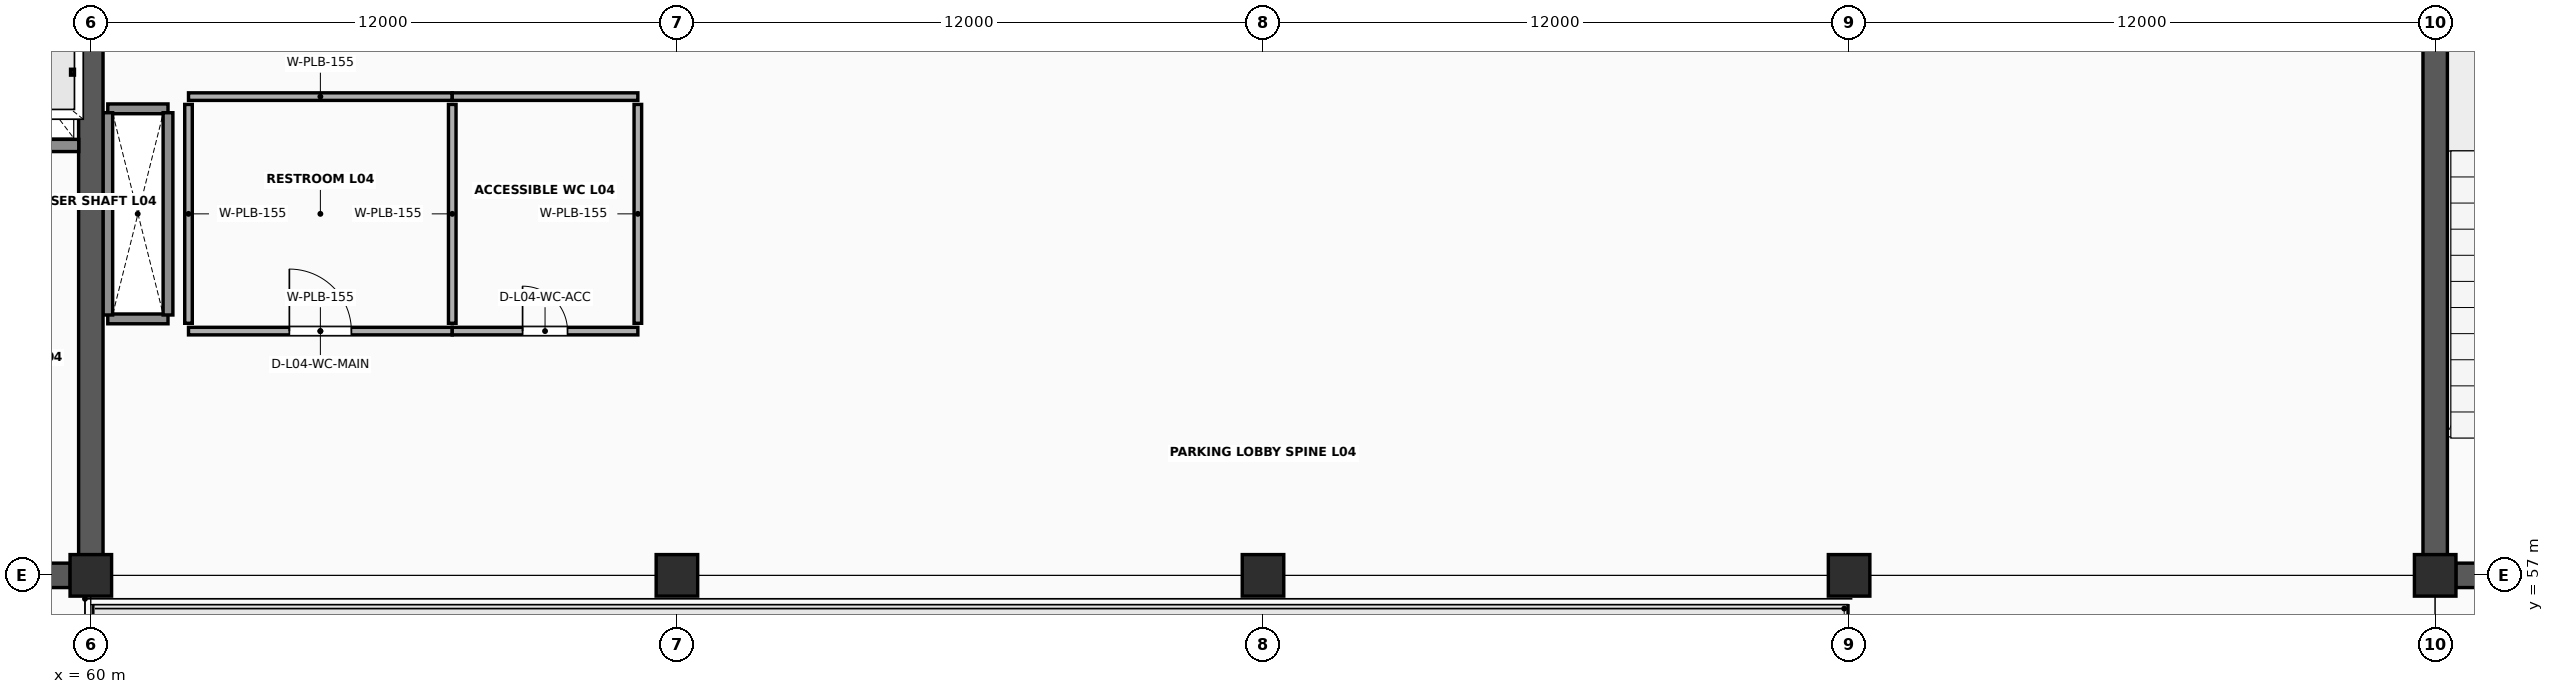
"""IFC4 building model, lengths in metres.
Left out: names, types, materials, properties, quantities, classifications, styles, units other than length and angle.
Written with IfcOpenShell. Run it as: python <this file> out.ifc"""

import sys

from ifc_helpers import new_model, si_unit, direction, frame, frame_2d, origin, origin_2d, place, context, subcontext, project, spatial, rectangle, extrude, element, fill, save


model = new_model("IFC4")
c1 = context("Model", 3, precision=1e-05, world=origin(), true_north=direction((0.0, 1.0)))
c2 = subcontext(c1, "Body", "Model", "MODEL_VIEW")
j1 = project(units=[si_unit("LENGTHUNIT", "METRE"), si_unit("PLANEANGLEUNIT", "RADIAN")], contexts=[c1])
p1 = place(None, origin())
s1 = spatial("IfcSite", under=j1, at=p1, CompositionType="ELEMENT")
p2 = place(p1, origin())
s2 = spatial("IfcBuilding", under=s1, at=p2, CompositionType="ELEMENT")
p3 = place(p2, frame((0.0, 0.0, 17.2)))
s3 = spatial("IfcBuildingStorey", under=s2, at=p3, CompositionType="ELEMENT", Elevation=17.2)
for number, where, z_axis, x_axis in (
    (1, (60.0, 57.0, 0.0), (0.0, 0.0, 1.0), (1.0, 0.0, 0.0)),
    (2, (72.0, 57.0, 0.0), (0.0, 0.0, 1.0), (1.0, 0.0, 0.0)),
    (3, (84.0, 57.0, 0.0), (0.0, 0.0, 1.0), (1.0, 0.0, 0.0)),
    (4, (96.0, 57.0, 0.0), (0.0, 0.0, 1.0), (1.0, 0.0, 0.0)),
    (5, (108.0, 57.0, 0.0), (0.0, 0.0, 1.0), (1.0, 0.0, 0.0)),
):
    element("IfcColumn", number, at=place(p3, frame(where, z_axis=z_axis, x_axis=x_axis)), inside=s3, PredefinedType="COLUMN", context=c2, shape_type="SweptSolid", body=[
        extrude(rectangle(XDim=0.85, YDim=0.85, at=origin_2d()), origin(), (0.0, 0.0, 1.0), 3.8),
    ])
for number, where, z_axis, x_axis in (
    (6, (60.347, 62.25, 0.0), (0.0, 0.0, 1.0), (1.0, 0.0, 0.0)),
    (7, (60.347, 66.55, 0.0), (0.0, 0.0, 1.0), (1.0, 0.0, 0.0)),
):
    element("IfcWall", number, at=place(p3, frame(where, z_axis=z_axis, x_axis=x_axis)), inside=s3, PredefinedType="SOLIDWALL", context=c2, shape_type="SweptSolid", body=[
        extrude(rectangle(XDim=1.233, YDim=0.2, at=frame_2d((0.617, 0.0))), origin(), (0.0, 0.0, 1.0), 3.643),
    ])
for number, where, z_axis, x_axis in (
    (8, (60.347, 62.33, 0.0), (0.0, 0.0, 1.0), (0.0, 1.0, 0.0)),
    (9, (61.58, 62.33, 0.0), (0.0, 0.0, 1.0), (0.0, 1.0, 0.0)),
):
    element("IfcWall", number, at=place(p3, frame(where, z_axis=z_axis, x_axis=x_axis)), inside=s3, PredefinedType="SOLIDWALL", context=c2, shape_type="SweptSolid", body=[
        extrude(rectangle(XDim=4.14, YDim=0.2, at=frame_2d((2.07, 0.0))), origin(), (0.0, 0.0, 1.0), 3.643),
    ])
p4 = place(p3, frame((48.422, 57.0, 0.0), z_axis=(0.0, 0.0, 1.0), x_axis=(1.0, 0.0, 0.0)))
e10 = element("IfcWall", 10, at=p4, inside=s3, PredefinedType="SHEAR", context=c2, shape_type="SweptSolid", body=[
    extrude(rectangle(XDim=11.156, YDim=0.5, at=frame_2d((5.578, 0.0))), origin(), (0.0, 0.0, 1.0), 3.643),
])
p5 = place(p4, frame((4.778, 0.0, 0.0)))
e11 = element("IfcOpeningElement", 11, at=p5, cuts=e10, PredefinedType="OPENING", context=c2, shape_type="SweptSolid", body=[
    extrude(rectangle(XDim=1.2, YDim=2.2, at=frame_2d((0.6, 1.1))), frame((0.0, 0.265, 0.0), z_axis=(0.0, -1.0, 0.0), x_axis=(1.0, 0.0, 0.0)), (0.0, 0.0, 1.0), 0.53),
])
p6 = place(p4, frame((8.478, 0.0, 0.0)))
e12 = element("IfcOpeningElement", 12, at=p6, cuts=e10, PredefinedType="OPENING", context=c2, shape_type="SweptSolid", body=[
    extrude(rectangle(XDim=1.5, YDim=2.25, at=frame_2d((0.75, 1.125))), frame((0.0, 0.265, 0.0), z_axis=(0.0, -1.0, 0.0), x_axis=(1.0, 0.0, 0.0)), (0.0, 0.0, 1.0), 0.53),
])
p7 = place(p3, frame((60.0, 57.422, 0.0), z_axis=(0.0, 0.0, 1.0), x_axis=(0.0, 1.0, 0.0)))
e13 = element("IfcWall", 13, at=p7, inside=s3, PredefinedType="SHEAR", context=c2, shape_type="SweptSolid", body=[
    extrude(rectangle(XDim=11.156, YDim=0.5, at=frame_2d((5.578, 0.0))), origin(), (0.0, 0.0, 1.0), 3.643),
])
p8 = place(p3, frame((52.597, 65.8, 0.0), z_axis=(0.0, 0.0, 1.0), x_axis=(1.0, 0.0, 0.0)))
e14 = element("IfcWall", 14, at=p8, inside=s3, PredefinedType="SOLIDWALL", context=c2, shape_type="SweptSolid", body=[
    extrude(rectangle(XDim=7.156, YDim=0.25, at=frame_2d((3.578, 0.0))), origin(), (0.0, 0.0, 1.0), 3.643),
])
p9 = place(p8, frame((0.653, 0.0, 0.0)))
e15 = element("IfcOpeningElement", 15, at=p9, cuts=e14, PredefinedType="OPENING", context=c2, shape_type="SweptSolid", body=[
    extrude(rectangle(XDim=1.1, YDim=2.24, at=frame_2d((0.55, 1.12))), frame((0.0, 0.14, 0.0), z_axis=(0.0, -1.0, 0.0), x_axis=(1.0, 0.0, 0.0)), (0.0, 0.0, 1.0), 0.28),
])
p10 = place(p8, frame((3.153, 0.0, 0.0)))
e16 = element("IfcOpeningElement", 16, at=p10, cuts=e14, PredefinedType="OPENING", context=c2, shape_type="SweptSolid", body=[
    extrude(rectangle(XDim=1.05, YDim=2.2, at=frame_2d((0.525, 1.1))), frame((0.0, 0.14, 0.0), z_axis=(0.0, -1.0, 0.0), x_axis=(1.0, 0.0, 0.0)), (0.0, 0.0, 1.0), 0.28),
])
p11 = place(p8, frame((5.528, 0.0, 0.0)))
e17 = element("IfcOpeningElement", 17, at=p11, cuts=e14, PredefinedType="OPENING", context=c2, shape_type="SweptSolid", body=[
    extrude(rectangle(XDim=1.05, YDim=2.2, at=frame_2d((0.525, 1.1))), frame((0.0, 0.14, 0.0), z_axis=(0.0, -1.0, 0.0), x_axis=(1.0, 0.0, 0.0)), (0.0, 0.0, 1.0), 0.28),
])
p12 = place(p3, frame((108.422, 57.0, 0.0), z_axis=(0.0, 0.0, 1.0), x_axis=(1.0, 0.0, 0.0)))
e18 = element("IfcWall", 18, at=p12, inside=s3, PredefinedType="SHEAR", context=c2, shape_type="SweptSolid", body=[
    extrude(rectangle(XDim=11.156, YDim=0.5, at=frame_2d((5.578, 0.0))), origin(), (0.0, 0.0, 1.0), 3.643),
])
p13 = place(p12, frame((4.778, 0.0, 0.0)))
e19 = element("IfcOpeningElement", 19, at=p13, cuts=e18, PredefinedType="OPENING", context=c2, shape_type="SweptSolid", body=[
    extrude(rectangle(XDim=1.2, YDim=2.2, at=frame_2d((0.6, 1.1))), frame((0.0, 0.265, 0.0), z_axis=(0.0, -1.0, 0.0), x_axis=(1.0, 0.0, 0.0)), (0.0, 0.0, 1.0), 0.53),
])
p14 = place(p12, frame((8.478, 0.0, 0.0)))
e20 = element("IfcOpeningElement", 20, at=p14, cuts=e18, PredefinedType="OPENING", context=c2, shape_type="SweptSolid", body=[
    extrude(rectangle(XDim=1.5, YDim=2.25, at=frame_2d((0.75, 1.125))), frame((0.0, 0.265, 0.0), z_axis=(0.0, -1.0, 0.0), x_axis=(1.0, 0.0, 0.0)), (0.0, 0.0, 1.0), 0.53),
])
p15 = place(p3, frame((108.0, 57.422, 0.0), z_axis=(0.0, 0.0, 1.0), x_axis=(0.0, 1.0, 0.0)))
e21 = element("IfcWall", 21, at=p15, inside=s3, PredefinedType="SHEAR", context=c2, shape_type="SweptSolid", body=[
    extrude(rectangle(XDim=11.156, YDim=0.5, at=frame_2d((5.578, 0.0))), origin(), (0.0, 0.0, 1.0), 3.643),
])
p16 = place(p3, frame((62.0, 62.0, 0.0), z_axis=(0.0, 0.0, 1.0), x_axis=(1.0, 0.0, 0.0)))
e22 = element("IfcWall", 22, at=p16, inside=s3, PredefinedType="PLUMBINGWALL", context=c2, shape_type="SweptSolid", body=[
    extrude(rectangle(XDim=5.4, YDim=0.155, at=frame_2d((2.7, 0.0))), origin(), (0.0, 0.0, 1.0), 2.75),
])
p17 = place(p16, frame((2.065, 0.0, 0.0)))
e23 = element("IfcOpeningElement", 23, at=p17, cuts=e22, PredefinedType="OPENING", context=c2, shape_type="SweptSolid", body=[
    extrude(rectangle(XDim=1.27, YDim=2.27, at=frame_2d((0.635, 1.135))), frame((0.0, 0.093, 0.0), z_axis=(0.0, -1.0, 0.0), x_axis=(1.0, 0.0, 0.0)), (0.0, 0.0, 1.0), 0.185),
])
p18 = place(p3, frame((62.0, 66.8, 0.0), z_axis=(0.0, 0.0, 1.0), x_axis=(1.0, 0.0, 0.0)))
e24 = element("IfcWall", 24, at=p18, inside=s3, PredefinedType="PLUMBINGWALL", context=c2, shape_type="SweptSolid", body=[
    extrude(rectangle(XDim=5.4, YDim=0.155, at=frame_2d((2.7, 0.0))), origin(), (0.0, 0.0, 1.0), 2.75),
])
for number, where, z_axis, x_axis in (
    (25, (62.0, 62.16, 0.0), (0.0, 0.0, 1.0), (0.0, 1.0, 0.0)),
    (26, (67.4, 62.16, 0.0), (0.0, 0.0, 1.0), (0.0, 1.0, 0.0)),
):
    element("IfcWall", number, at=place(p3, frame(where, z_axis=z_axis, x_axis=x_axis)), inside=s3, PredefinedType="PLUMBINGWALL", context=c2, shape_type="SweptSolid", body=[
        extrude(rectangle(XDim=4.48, YDim=0.155, at=frame_2d((2.24, 0.0))), origin(), (0.0, 0.0, 1.0), 2.75),
    ])
p19 = place(p3, frame((67.4, 62.0, 0.0), z_axis=(0.0, 0.0, 1.0), x_axis=(1.0, 0.0, 0.0)))
e27 = element("IfcWall", 27, at=p19, inside=s3, PredefinedType="PLUMBINGWALL", context=c2, shape_type="SweptSolid", body=[
    extrude(rectangle(XDim=3.8, YDim=0.155, at=frame_2d((1.9, 0.0))), origin(), (0.0, 0.0, 1.0), 2.75),
])
p20 = place(p19, frame((1.44, 0.0, 0.0)))
e28 = element("IfcOpeningElement", 28, at=p20, cuts=e27, PredefinedType="OPENING", context=c2, shape_type="SweptSolid", body=[
    extrude(rectangle(XDim=0.92, YDim=2.1, at=frame_2d((0.46, 1.05))), frame((0.0, 0.093, 0.0), z_axis=(0.0, -1.0, 0.0), x_axis=(1.0, 0.0, 0.0)), (0.0, 0.0, 1.0), 0.185),
])
p21 = place(p3, frame((67.4, 66.8, 0.0), z_axis=(0.0, 0.0, 1.0), x_axis=(1.0, 0.0, 0.0)))
e29 = element("IfcWall", 29, at=p21, inside=s3, PredefinedType="PLUMBINGWALL", context=c2, shape_type="SweptSolid", body=[
    extrude(rectangle(XDim=3.8, YDim=0.155, at=frame_2d((1.9, 0.0))), origin(), (0.0, 0.0, 1.0), 2.75),
])
p22 = place(p3, frame((71.2, 62.16, 0.0), z_axis=(0.0, 0.0, 1.0), x_axis=(0.0, 1.0, 0.0)))
e30 = element("IfcWall", 30, at=p22, inside=s3, PredefinedType="PLUMBINGWALL", context=c2, shape_type="SweptSolid", body=[
    extrude(rectangle(XDim=4.48, YDim=0.155, at=frame_2d((2.24, 0.0))), origin(), (0.0, 0.0, 1.0), 2.75),
])
p23 = place(p17, origin())
e31 = element("IfcDoor", 31, at=p23, inside=s3, OperationType="SINGLE_SWING_LEFT", PredefinedType="DOOR", context=c2, shape_type="SweptSolid", body=[
    extrude(rectangle(XDim=1.27, YDim=2.27, at=frame_2d((0.635, 1.135))), frame((0.0, 0.025, 0.0), z_axis=(0.0, -1.0, 0.0), x_axis=(1.0, 0.0, 0.0)), (0.0, 0.0, 1.0), 0.05),
])
fill(e23, e31)
p24 = place(p20, origin())
e32 = element("IfcDoor", 32, at=p24, inside=s3, OperationType="SINGLE_SWING_LEFT", PredefinedType="DOOR", context=c2, shape_type="SweptSolid", body=[
    extrude(rectangle(XDim=0.92, YDim=2.1, at=frame_2d((0.46, 1.05))), frame((0.0, 0.025, 0.0), z_axis=(0.0, -1.0, 0.0), x_axis=(1.0, 0.0, 0.0)), (0.0, 0.0, 1.0), 0.05),
])
fill(e28, e32)
save(model, sys.argv[1])
